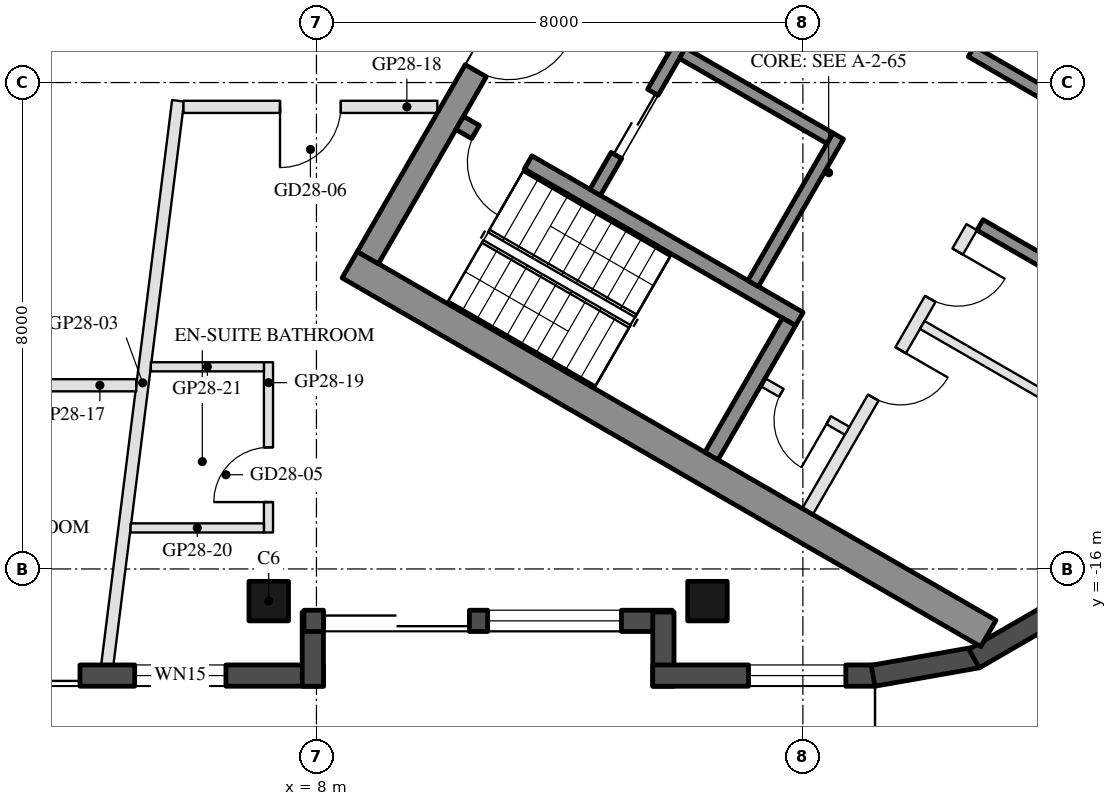
"""IFC4 building model, lengths in metres.
Left out: names, types, materials, properties, quantities, classifications, styles, units other than length and angle.
Written with IfcOpenShell. Run it as: python <this file> out.ifc"""

import sys

from ifc_helpers import new_model, si_unit, direction, frame, frame_2d, origin, origin_2d, place, context, subcontext, project, spatial, rectangle, hollow_rectangle, extrude, boolean, halfspace, element, fill, save


model = new_model("IFC4")
c1 = context("Model", 3, precision=1e-05, world=origin(), true_north=direction((0.0, 1.0)))
c2 = subcontext(c1, "Body", "Model", "MODEL_VIEW")
j1 = project(units=[si_unit("LENGTHUNIT", "METRE"), si_unit("PLANEANGLEUNIT", "RADIAN")], contexts=[c1])
p1 = place(None, origin())
s1 = spatial("IfcSite", under=j1, at=p1, CompositionType="ELEMENT")
p2 = place(p1, origin())
s2 = spatial("IfcBuilding", under=s1, at=p2, CompositionType="ELEMENT")
p3 = place(p2, frame((0.0, 0.0, 283.7)))
s3 = spatial("IfcBuildingStorey", under=s2, at=p3, CompositionType="ELEMENT", Elevation=283.7)
p4 = place(p3, frame((7.215, -16.529, 0.0), z_axis=(0.0, 0.0, 1.0), x_axis=(-1.0, 0.0, 0.0)))
e1 = element("IfcColumn", 1, at=p4, inside=s3, PredefinedType="COLUMN", context=c2, shape_type="SweptSolid", body=[
    boolean("DIFFERENCE", extrude(hollow_rectangle(XDim=0.65, YDim=0.65, WallThickness=0.03, at=origin_2d()), origin(), (0.0, 0.0, 1.0), 3.7), halfspace(frame((0.0, 0.0, 3.66), z_axis=(0.0, 0.0, 1.0), x_axis=(1.0, 0.0, 0.0)), False)),
])
p5 = place(p3, frame((14.431, -16.529, 0.0), z_axis=(0.0, 0.0, 1.0), x_axis=(-1.0, 0.0, 0.0)))
e2 = element("IfcColumn", 2, at=p5, inside=s3, PredefinedType="COLUMN", context=c2, shape_type="SweptSolid", body=[
    boolean("DIFFERENCE", extrude(hollow_rectangle(XDim=0.65, YDim=0.65, WallThickness=0.03, at=origin_2d()), origin(), (0.0, 0.0, 1.0), 3.7), halfspace(frame((0.0, 0.0, 3.653), z_axis=(0.0, 0.0, 1.0), x_axis=(1.0, 0.0, 0.0)), False)),
])
p6 = place(p3, frame((-0.9, -17.754, 0.0), z_axis=(0.0, 0.0, 1.0), x_axis=(1.0, 0.0, 0.0)))
e3 = element("IfcWall", 3, at=p6, inside=s3, PredefinedType="SOLIDWALL", context=c2, shape_type="SweptSolid", body=[
    extrude(rectangle(XDim=9.015, YDim=0.35, at=frame_2d((4.508, 0.0))), origin(), (0.0, 0.0, 1.0), 3.55),
])
p7 = place(p6, frame((3.211, 0.0, 0.0)))
e4 = element("IfcOpeningElement", 4, at=p7, cuts=e3, PredefinedType="OPENING", context=c2, shape_type="SweptSolid", body=[
    extrude(rectangle(XDim=1.8, YDim=2.4, at=frame_2d((0.9, 1.2))), frame((0.0, 0.185, 0.0), z_axis=(0.0, -1.0, 0.0), x_axis=(1.0, 0.0, 0.0)), (0.0, 0.0, 1.0), 0.37),
])
p8 = place(p6, frame((1.575, 0.0, 0.3)))
e5 = element("IfcOpeningElement", 5, at=p8, cuts=e3, PredefinedType="OPENING", context=c2, shape_type="SweptSolid", body=[
    extrude(rectangle(XDim=1.3, YDim=2.65, at=frame_2d((0.65, 1.325))), frame((0.0, 0.185, 0.0), z_axis=(0.0, -1.0, 0.0), x_axis=(1.0, 0.0, 0.0)), (0.0, 0.0, 1.0), 0.37),
])
p9 = place(p6, frame((5.911, 0.0, 0.3)))
e6 = element("IfcOpeningElement", 6, at=p9, cuts=e3, PredefinedType="OPENING", context=c2, shape_type="SweptSolid", body=[
    extrude(rectangle(XDim=1.5, YDim=2.65, at=frame_2d((0.75, 1.325))), frame((0.0, 0.185, 0.0), z_axis=(0.0, -1.0, 0.0), x_axis=(1.0, 0.0, 0.0)), (0.0, 0.0, 1.0), 0.37),
])
p10 = place(p3, frame((7.94, -17.929, 0.0), z_axis=(0.0, 0.0, 1.0), x_axis=(0.0, 1.0, 0.0)))
e7 = element("IfcWall", 7, at=p10, inside=s3, PredefinedType="SOLIDWALL", context=c2, shape_type="SweptSolid", body=[
    extrude(rectangle(XDim=1.22, YDim=0.35, at=frame_2d((0.61, 0.0))), origin(), (0.0, 0.0, 1.0), 3.55),
])
p11 = place(p3, frame((7.795, -16.854, 0.0), z_axis=(0.0, 0.0, 1.0), x_axis=(1.0, 0.0, 0.0)))
e8 = element("IfcWall", 8, at=p11, inside=s3, PredefinedType="SOLIDWALL", context=c2, shape_type="SweptSolid", body=[
    extrude(rectangle(XDim=6.055, YDim=0.35, at=frame_2d((3.028, 0.0))), origin(), (0.0, 0.0, 1.0), 3.55),
])
p12 = place(p11, frame((0.32, 0.0, 0.0)))
e9 = element("IfcOpeningElement", 9, at=p12, cuts=e8, PredefinedType="OPENING", context=c2, shape_type="SweptSolid", body=[
    extrude(rectangle(XDim=2.4, YDim=2.4, at=frame_2d((1.2, 1.2))), frame((0.0, 0.185, 0.0), z_axis=(0.0, -1.0, 0.0), x_axis=(1.0, 0.0, 0.0)), (0.0, 0.0, 1.0), 0.37),
])
p13 = place(p11, frame((3.02, 0.0, 0.3)))
e10 = element("IfcOpeningElement", 10, at=p13, cuts=e8, PredefinedType="OPENING", context=c2, shape_type="SweptSolid", body=[
    extrude(rectangle(XDim=2.2, YDim=2.65, at=frame_2d((1.1, 1.325))), frame((0.0, 0.185, 0.0), z_axis=(0.0, -1.0, 0.0), x_axis=(1.0, 0.0, 0.0)), (0.0, 0.0, 1.0), 0.37),
])
p14 = place(p3, frame((13.706, -16.709, 0.0), z_axis=(0.0, 0.0, 1.0), x_axis=(0.0, -1.0, 0.0)))
e11 = element("IfcWall", 11, at=p14, inside=s3, PredefinedType="SOLIDWALL", context=c2, shape_type="SweptSolid", body=[
    extrude(rectangle(XDim=1.22, YDim=0.35, at=frame_2d((0.61, 0.0))), origin(), (0.0, 0.0, 1.0), 3.55),
])
p15 = place(p3, frame((13.531, -17.754, 0.0), z_axis=(0.0, 0.0, 1.0), x_axis=(1.0, 0.0, 0.0)))
e12 = element("IfcWall", 12, at=p15, inside=s3, PredefinedType="SOLIDWALL", context=c2, shape_type="SweptSolid", body=[
    extrude(rectangle(XDim=3.654, YDim=0.35, at=frame_2d((1.827, 0.0))), origin(), (0.0, 0.0, 1.0), 3.55),
])
p16 = place(p15, frame((1.575, 0.0, 0.3)))
e13 = element("IfcOpeningElement", 13, at=p16, cuts=e12, PredefinedType="OPENING", context=c2, shape_type="SweptSolid", body=[
    extrude(rectangle(XDim=1.6, YDim=2.65, at=frame_2d((0.8, 1.325))), frame((0.0, 0.185, 0.0), z_axis=(0.0, -1.0, 0.0), x_axis=(1.0, 0.0, 0.0)), (0.0, 0.0, 1.0), 0.37),
])
for number, where, z_axis, x_axis in (
    (14, (17.155, -17.756, 0.0), (0.0, 0.0, 1.0), (0.985, 0.174, 0.0)),
    (15, (18.816, -17.474, 0.0), (0.0, 0.0, 1.0), (0.866, 0.5, 0.0)),
):
    element("IfcWall", number, at=place(p3, frame(where, z_axis=z_axis, x_axis=x_axis)), inside=s3, PredefinedType="SOLIDWALL", context=c2, shape_type="SweptSolid", body=[
        extrude(rectangle(XDim=1.745, YDim=0.35, at=frame_2d((0.872, 0.0))), origin(), (0.0, 0.0, 1.0), 3.55),
    ])
for number, where, z_axis, x_axis in (
    (16, (8.547, -10.997, 0.0), (0.0, 0.0, 1.0), (0.866, -0.5, 0.0)),
    (17, (13.797, -1.903, 0.0), (0.0, 0.0, 1.0), (0.866, -0.5, 0.0)),
):
    element("IfcWall", number, at=place(p3, frame(where, z_axis=z_axis, x_axis=x_axis)), inside=s3, PredefinedType="SHEAR", context=c2, shape_type="SweptSolid", body=[
        extrude(rectangle(XDim=12.129, YDim=0.5, at=frame_2d((6.064, 0.0))), origin(), (0.0, 0.0, 1.0), 3.5),
    ])
p17 = place(p3, frame((8.845, -10.88, 0.0), z_axis=(0.0, 0.0, 1.0), x_axis=(0.500004234368, 0.866022959057, 0.0)))
e18 = element("IfcWall", 18, at=p17, inside=s3, PredefinedType="SHEAR", context=c2, shape_type="SweptSolid", body=[
    extrude(rectangle(XDim=10.0, YDim=0.4, at=frame_2d((5.0, 0.0))), origin(), (0.0, 0.0, 1.0), 3.5),
])
p18 = place(p17, frame((3.55, 0.0, 0.0)))
e19 = element("IfcOpeningElement", 19, at=p18, cuts=e18, PredefinedType="OPENING", context=c2, shape_type="SweptSolid", body=[
    extrude(rectangle(XDim=1.1, YDim=2.1, at=frame_2d((0.55, 1.05))), frame((0.0, 0.21, 0.0), z_axis=(0.0, -1.0, 0.0), x_axis=(1.0, 0.0, 0.0)), (0.0, 0.0, 1.0), 0.42),
])
p19 = place(p17, frame((5.85, 0.0, 0.0)))
e20 = element("IfcOpeningElement", 20, at=p19, cuts=e18, PredefinedType="OPENING", context=c2, shape_type="SweptSolid", body=[
    extrude(rectangle(XDim=1.4, YDim=2.1, at=frame_2d((0.7, 1.05))), frame((0.0, 0.21, 0.0), z_axis=(0.0, -1.0, 0.0), x_axis=(1.0, 0.0, 0.0)), (0.0, 0.0, 1.0), 0.42),
])
p20 = place(p3, frame((10.356, -8.664, 0.0), z_axis=(0.0, 0.0, 1.0), x_axis=(0.866028629588, -0.499994412703, 0.0)))
e21 = element("IfcWall", 21, at=p20, inside=s3, PredefinedType="SHEAR", context=c2, shape_type="SweptSolid", body=[
    extrude(rectangle(XDim=6.45, YDim=0.25, at=frame_2d((3.225, 0.0))), origin(), (0.0, 0.0, 1.0), 3.5),
])
p21 = place(p20, frame((0.3, 0.0, 0.0)))
e22 = element("IfcOpeningElement", 22, at=p21, cuts=e21, PredefinedType="OPENING", context=c2, shape_type="SweptSolid", body=[
    extrude(rectangle(XDim=1.0, YDim=2.1, at=frame_2d((0.5, 1.05))), frame((0.0, 0.135, 0.0), z_axis=(0.0, -1.0, 0.0), x_axis=(1.0, 0.0, 0.0)), (0.0, 0.0, 1.0), 0.27),
])
p22 = place(p3, frame((14.496, -14.143, 0.0), z_axis=(0.0, 0.0, 1.0), x_axis=(0.500062241894, 0.865989465428, 0.0)))
e23 = element("IfcWall", 23, at=p22, inside=s3, PredefinedType="SHEAR", context=c2, shape_type="SweptSolid", body=[
    extrude(rectangle(XDim=2.55, YDim=0.25, at=frame_2d((1.275, 0.0))), origin(), (0.0, 0.0, 1.0), 3.5),
])
p23 = place(p3, frame((15.181, -11.305, 0.0), z_axis=(0.0, 0.0, 1.0), x_axis=(0.49994636267, 0.866056369097, 0.0)))
e24 = element("IfcWall", 24, at=p23, inside=s3, PredefinedType="SHEAR", context=c2, shape_type="SweptSolid", body=[
    extrude(rectangle(XDim=2.8, YDim=0.2, at=frame_2d((1.4, 0.0))), origin(), (0.0, 0.0, 1.0), 3.5),
])
p24 = place(p3, frame((12.583, -9.805, 0.0), z_axis=(0.0, 0.0, 1.0), x_axis=(0.49994636267, 0.866056369097, 0.0)))
e25 = element("IfcWall", 25, at=p24, inside=s3, PredefinedType="SHEAR", context=c2, shape_type="SweptSolid", body=[
    extrude(rectangle(XDim=2.8, YDim=0.2, at=frame_2d((1.4, 0.0))), origin(), (0.0, 0.0, 1.0), 3.5),
])
p25 = place(p24, frame((0.7, 0.0, 0.0)))
e26 = element("IfcOpeningElement", 26, at=p25, cuts=e25, PredefinedType="OPENING", context=c2, shape_type="SweptSolid", body=[
    extrude(rectangle(XDim=1.2, YDim=2.1, at=frame_2d((0.6, 1.05))), frame((0.0, 0.11, 0.0), z_axis=(0.0, -1.0, 0.0), x_axis=(1.0, 0.0, 0.0)), (0.0, 0.0, 1.0), 0.22),
])
p26 = place(p3, frame((11.768, -6.217, 0.0), z_axis=(0.0, 0.0, 1.0), x_axis=(0.866050077142, -0.499957262057, 0.0)))
e27 = element("IfcWall", 27, at=p26, inside=s3, PredefinedType="SHEAR", context=c2, shape_type="SweptSolid", body=[
    extrude(rectangle(XDim=2.4, YDim=0.2, at=frame_2d((1.2, 0.0))), origin(), (0.0, 0.0, 1.0), 3.5),
])
p27 = place(p3, frame((14.02, -7.517, 0.0), z_axis=(0.0, 0.0, 1.0), x_axis=(0.866034573852, -0.49998411664, 0.0)))
e28 = element("IfcWall", 28, at=p27, inside=s3, PredefinedType="SHEAR", context=c2, shape_type="SweptSolid", body=[
    extrude(rectangle(XDim=2.8, YDim=0.2, at=frame_2d((1.4, 0.0))), origin(), (0.0, 0.0, 1.0), 3.5),
])
p28 = place(p3, frame((12.968, -4.138, 0.0), z_axis=(0.0, 0.0, 1.0), x_axis=(0.866028328073, -0.49999493495, 0.0)))
e29 = element("IfcWall", 29, at=p28, inside=s3, PredefinedType="SHEAR", context=c2, shape_type="SweptSolid", body=[
    extrude(rectangle(XDim=10.16, YDim=0.2, at=frame_2d((5.08, 0.0))), origin(), (0.0, 0.0, 1.0), 3.5),
])
p29 = place(p28, frame((0.62, 0.0, 0.0)))
e30 = element("IfcOpeningElement", 30, at=p29, cuts=e29, PredefinedType="OPENING", context=c2, shape_type="SweptSolid", body=[
    extrude(rectangle(XDim=1.1, YDim=2.1, at=frame_2d((0.55, 1.05))), frame((0.0, 0.11, 0.0), z_axis=(0.0, -1.0, 0.0), x_axis=(1.0, 0.0, 0.0)), (0.0, 0.0, 1.0), 0.22),
])
p30 = place(p28, frame((5.8, 0.0, 0.0)))
e31 = element("IfcOpeningElement", 31, at=p30, cuts=e29, PredefinedType="OPENING", context=c2, shape_type="SweptSolid", body=[
    extrude(rectangle(XDim=0.9, YDim=2.1, at=frame_2d((0.45, 1.05))), frame((0.0, 0.11, 0.0), z_axis=(0.0, -1.0, 0.0), x_axis=(1.0, 0.0, 0.0)), (0.0, 0.0, 1.0), 0.22),
])
p31 = place(p3, frame((18.913, -10.342, 0.0), z_axis=(0.0, 0.0, 1.0), x_axis=(0.866038183914, -0.499977863513, 0.0)))
e32 = element("IfcWall", 32, at=p31, inside=s3, PredefinedType="SHEAR", context=c2, shape_type="SweptSolid", body=[
    extrude(rectangle(XDim=1.71, YDim=0.2, at=frame_2d((0.855, 0.0))), origin(), (0.0, 0.0, 1.0), 3.5),
])
p32 = place(p3, frame((16.076, -15.055, 0.0), z_axis=(0.0, 0.0, 1.0), x_axis=(0.499995103361, 0.866028230842, 0.0)))
e33 = element("IfcWall", 33, at=p32, inside=s3, PredefinedType="PARTITIONING", context=c2, shape_type="SweptSolid", body=[
    extrude(rectangle(XDim=5.4, YDim=0.2, at=frame_2d((2.7, 0.0))), origin(), (0.0, 0.0, 1.0), 3.5),
])
p33 = place(p32, frame((2.163, 0.0, 0.0)))
e34 = element("IfcOpeningElement", 34, at=p33, cuts=e33, PredefinedType="OPENING", context=c2, shape_type="SweptSolid", body=[
    extrude(rectangle(XDim=0.9, YDim=2.1, at=frame_2d((0.45, 1.05))), frame((0.0, 0.11, 0.0), z_axis=(0.0, -1.0, 0.0), x_axis=(1.0, 0.0, 0.0)), (0.0, 0.0, 1.0), 0.22),
])
p34 = place(p32, frame((4.038, 0.0, 0.0)))
e35 = element("IfcOpeningElement", 35, at=p34, cuts=e33, PredefinedType="OPENING", context=c2, shape_type="SweptSolid", body=[
    extrude(rectangle(XDim=0.9, YDim=2.1, at=frame_2d((0.45, 1.05))), frame((0.0, 0.11, 0.0), z_axis=(0.0, -1.0, 0.0), x_axis=(1.0, 0.0, 0.0)), (0.0, 0.0, 1.0), 0.22),
])
p35 = place(p3, frame((15.342, -12.928, 0.0), z_axis=(0.0, 0.0, 1.0), x_axis=(0.865989903783, -0.500061482766, 0.0)))
e36 = element("IfcWall", 36, at=p35, inside=s3, PredefinedType="PARTITIONING", context=c2, shape_type="SweptSolid", body=[
    extrude(rectangle(XDim=1.6, YDim=0.15, at=frame_2d((0.8, 0.0))), origin(), (0.0, 0.0, 1.0), 3.5),
])
p36 = place(p35, frame((0.35, 0.0, 0.0)))
e37 = element("IfcOpeningElement", 37, at=p36, cuts=e36, PredefinedType="OPENING", context=c2, shape_type="SweptSolid", body=[
    extrude(rectangle(XDim=0.9, YDim=2.1, at=frame_2d((0.45, 1.05))), frame((0.0, 0.085, 0.0), z_axis=(0.0, -1.0, 0.0), x_axis=(1.0, 0.0, 0.0)), (0.0, 0.0, 1.0), 0.17),
])
p37 = place(p3, frame((17.963, -11.987, 0.0), z_axis=(0.0, 0.0, 1.0), x_axis=(0.866010510293, -0.500025795397, 0.0)))
e38 = element("IfcWall", 38, at=p37, inside=s3, PredefinedType="PARTITIONING", context=c2, shape_type="SweptSolid", body=[
    extrude(rectangle(XDim=4.459, YDim=0.15, at=frame_2d((2.229, 0.0))), origin(), (0.0, 0.0, 1.0), 3.5),
])
p38 = place(p3, frame((4.56, -17.579, 0.0), z_axis=(0.0, 0.0, 1.0), x_axis=(0.124584174438, 0.992209042228, 0.0)))
e39 = element("IfcWall", 39, at=p38, inside=s3, PredefinedType="PARTITIONING", context=c2, shape_type="SweptSolid", body=[
    extrude(rectangle(XDim=9.351, YDim=0.2, at=frame_2d((4.676, 0.0))), origin(), (0.0, 0.0, 1.0), 3.1),
])
p39 = place(p3, frame((5.037, -12.979, 0.0), z_axis=(0.0, 0.0, 1.0), x_axis=(-1.0, 0.0, 0.0)))
e40 = element("IfcWall", 40, at=p39, inside=s3, PredefinedType="PARTITIONING", context=c2, shape_type="SweptSolid", body=[
    extrude(rectangle(XDim=4.988, YDim=0.2, at=frame_2d((2.494, 0.0))), origin(), (0.0, 0.0, 1.0), 3.05),
])
p40 = place(p39, frame((1.994, 0.0, 0.0)))
e41 = element("IfcOpeningElement", 41, at=p40, cuts=e40, PredefinedType="OPENING", context=c2, shape_type="SweptSolid", body=[
    extrude(rectangle(XDim=1.0, YDim=2.1, at=frame_2d((0.5, 1.05))), frame((0.0, 0.11, 0.0), z_axis=(0.0, -1.0, 0.0), x_axis=(1.0, 0.0, 0.0)), (0.0, 0.0, 1.0), 0.22),
])
p41 = place(p3, frame((9.988, -8.4, 0.0), z_axis=(0.0, 0.0, 1.0), x_axis=(-1.0, 0.0, 0.0)))
e42 = element("IfcWall", 42, at=p41, inside=s3, PredefinedType="PARTITIONING", context=c2, shape_type="SweptSolid", body=[
    extrude(rectangle(XDim=4.175, YDim=0.2, at=frame_2d((2.087, 0.0))), origin(), (0.0, 0.0, 1.0), 3.05),
])
p42 = place(p41, frame((1.587, 0.0, 0.0)))
e43 = element("IfcOpeningElement", 43, at=p42, cuts=e42, PredefinedType="OPENING", context=c2, shape_type="SweptSolid", body=[
    extrude(rectangle(XDim=1.0, YDim=2.1, at=frame_2d((0.5, 1.05))), frame((0.0, 0.11, 0.0), z_axis=(0.0, -1.0, 0.0), x_axis=(1.0, 0.0, 0.0)), (0.0, 0.0, 1.0), 0.22),
])
p43 = place(p3, frame((7.211, -15.4, 0.0), z_axis=(0.0, 0.0, 1.0), x_axis=(0.0, 1.0, 0.0)))
e44 = element("IfcWall", 44, at=p43, inside=s3, PredefinedType="PARTITIONING", context=c2, shape_type="SweptSolid", body=[
    extrude(rectangle(XDim=2.8, YDim=0.15, at=frame_2d((1.4, 0.0))), origin(), (0.0, 0.0, 1.0), 3.05),
])
p44 = place(p43, frame((0.5, 0.0, 0.0)))
e45 = element("IfcOpeningElement", 45, at=p44, cuts=e44, PredefinedType="OPENING", context=c2, shape_type="SweptSolid", body=[
    extrude(rectangle(XDim=0.9, YDim=2.1, at=frame_2d((0.45, 1.05))), frame((0.0, 0.085, 0.0), z_axis=(0.0, -1.0, 0.0), x_axis=(1.0, 0.0, 0.0)), (0.0, 0.0, 1.0), 0.17),
])
p45 = place(p3, frame((4.944, -15.325, 0.0), z_axis=(0.0, 0.0, 1.0), x_axis=(1.0, 0.0, 0.0)))
e46 = element("IfcWall", 46, at=p45, inside=s3, PredefinedType="PARTITIONING", context=c2, shape_type="SweptSolid", body=[
    extrude(rectangle(XDim=2.192, YDim=0.15, at=frame_2d((1.096, 0.0))), origin(), (0.0, 0.0, 1.0), 3.05),
])
p46 = place(p3, frame((5.277, -12.675, 0.0), z_axis=(0.0, 0.0, 1.0), x_axis=(1.0, 0.0, 0.0)))
e47 = element("IfcWall", 47, at=p46, inside=s3, PredefinedType="PARTITIONING", context=c2, shape_type="SweptSolid", body=[
    extrude(rectangle(XDim=1.859, YDim=0.15, at=frame_2d((0.93, 0.0))), origin(), (0.0, 0.0, 1.0), 3.05),
])
p47 = place(p7, frame((1.8, 0.0, 0.0), z_axis=(0.0, 0.0, 1.0), x_axis=(-1.0, 0.0, 0.0)))
e48 = element("IfcDoor", 48, at=p47, inside=s3, OperationType="SLIDING_TO_LEFT", PredefinedType="DOOR", context=c2, shape_type="SweptSolid", body=[
    extrude(rectangle(XDim=1.8, YDim=2.4, at=frame_2d((0.9, 1.2))), frame((0.0, 0.025, 0.0), z_axis=(0.0, -1.0, 0.0), x_axis=(1.0, 0.0, 0.0)), (0.0, 0.0, 1.0), 0.05),
])
fill(e4, e48)
p48 = place(p9, origin())
e49 = element("IfcWindow", 49, at=p48, inside=s3, PartitioningType="SINGLE_PANEL", PredefinedType="WINDOW", context=c2, shape_type="SweptSolid", body=[
    extrude(rectangle(XDim=1.5, YDim=2.65, at=frame_2d((0.75, 1.325))), frame((0.0, 0.03, 0.0), z_axis=(0.0, -1.0, 0.0), x_axis=(1.0, 0.0, 0.0)), (0.0, 0.0, 1.0), 0.06),
])
fill(e6, e49)
p49 = place(p12, frame((2.4, 0.0, 0.0), z_axis=(0.0, 0.0, 1.0), x_axis=(-1.0, 0.0, 0.0)))
e50 = element("IfcDoor", 50, at=p49, inside=s3, OperationType="SLIDING_TO_LEFT", PredefinedType="DOOR", context=c2, shape_type="SweptSolid", body=[
    extrude(rectangle(XDim=2.4, YDim=2.4, at=frame_2d((1.2, 1.2))), frame((0.0, 0.025, 0.0), z_axis=(0.0, -1.0, 0.0), x_axis=(1.0, 0.0, 0.0)), (0.0, 0.0, 1.0), 0.05),
])
fill(e9, e50)
p50 = place(p13, origin())
e51 = element("IfcWindow", 51, at=p50, inside=s3, PartitioningType="SINGLE_PANEL", PredefinedType="WINDOW", context=c2, shape_type="SweptSolid", body=[
    extrude(rectangle(XDim=2.2, YDim=2.65, at=frame_2d((1.1, 1.325))), frame((0.0, 0.03, 0.0), z_axis=(0.0, -1.0, 0.0), x_axis=(1.0, 0.0, 0.0)), (0.0, 0.0, 1.0), 0.06),
])
fill(e10, e51)
p51 = place(p16, origin())
e52 = element("IfcWindow", 52, at=p51, inside=s3, PartitioningType="SINGLE_PANEL", PredefinedType="WINDOW", context=c2, shape_type="SweptSolid", body=[
    extrude(rectangle(XDim=1.6, YDim=2.65, at=frame_2d((0.8, 1.325))), frame((0.0, 0.03, 0.0), z_axis=(0.0, -1.0, 0.0), x_axis=(1.0, 0.0, 0.0)), (0.0, 0.0, 1.0), 0.06),
])
fill(e13, e52)
p52 = place(p25, origin())
e53 = element("IfcDoor", 53, at=p52, inside=s3, OperationType="DOUBLE_DOOR_SLIDING", PredefinedType="DOOR", context=c2, shape_type="SweptSolid", body=[
    extrude(rectangle(XDim=1.2, YDim=2.1, at=frame_2d((0.6, 1.05))), frame((0.0, 0.025, 0.0), z_axis=(0.0, -1.0, 0.0), x_axis=(1.0, 0.0, 0.0)), (0.0, 0.0, 1.0), 0.05),
])
fill(e26, e53)
p53 = place(p36, frame((0.9, 0.0, 0.0), z_axis=(0.0, 0.0, 1.0), x_axis=(-1.0, 0.0, 0.0)))
e54 = element("IfcDoor", 54, at=p53, inside=s3, OperationType="SINGLE_SWING_LEFT", PredefinedType="DOOR", context=c2, shape_type="SweptSolid", body=[
    extrude(rectangle(XDim=0.9, YDim=2.1, at=frame_2d((0.45, 1.05))), frame((0.0, 0.025, 0.0), z_axis=(0.0, -1.0, 0.0), x_axis=(1.0, 0.0, 0.0)), (0.0, 0.0, 1.0), 0.05),
])
fill(e37, e54)
p54 = place(p30, origin())
e55 = element("IfcDoor", 55, at=p54, inside=s3, OperationType="SINGLE_SWING_LEFT", PredefinedType="DOOR", context=c2, shape_type="SweptSolid", body=[
    extrude(rectangle(XDim=0.9, YDim=2.1, at=frame_2d((0.45, 1.05))), frame((0.0, 0.025, 0.0), z_axis=(0.0, -1.0, 0.0), x_axis=(1.0, 0.0, 0.0)), (0.0, 0.0, 1.0), 0.05),
])
fill(e31, e55)
p55 = place(p33, frame((0.9, 0.0, 0.0), z_axis=(0.0, 0.0, 1.0), x_axis=(-1.0, 0.0, 0.0)))
e56 = element("IfcDoor", 56, at=p55, inside=s3, OperationType="SINGLE_SWING_LEFT", PredefinedType="DOOR", context=c2, shape_type="SweptSolid", body=[
    extrude(rectangle(XDim=0.9, YDim=2.1, at=frame_2d((0.45, 1.05))), frame((0.0, 0.025, 0.0), z_axis=(0.0, -1.0, 0.0), x_axis=(1.0, 0.0, 0.0)), (0.0, 0.0, 1.0), 0.05),
])
fill(e34, e56)
p56 = place(p34, frame((0.9, 0.0, 0.0), z_axis=(0.0, 0.0, 1.0), x_axis=(-1.0, 0.0, 0.0)))
e57 = element("IfcDoor", 57, at=p56, inside=s3, OperationType="SINGLE_SWING_LEFT", PredefinedType="DOOR", context=c2, shape_type="SweptSolid", body=[
    extrude(rectangle(XDim=0.9, YDim=2.1, at=frame_2d((0.45, 1.05))), frame((0.0, 0.025, 0.0), z_axis=(0.0, -1.0, 0.0), x_axis=(1.0, 0.0, 0.0)), (0.0, 0.0, 1.0), 0.05),
])
fill(e35, e57)
p57 = place(p18, frame((1.1, 0.0, 0.0), z_axis=(0.0, 0.0, 1.0), x_axis=(-1.0, 0.0, 0.0)))
e58 = element("IfcDoor", 58, at=p57, inside=s3, OperationType="SINGLE_SWING_LEFT", PredefinedType="DOOR", context=c2, shape_type="SweptSolid", body=[
    extrude(rectangle(XDim=1.1, YDim=2.1, at=frame_2d((0.55, 1.05))), frame((0.0, 0.025, 0.0), z_axis=(0.0, -1.0, 0.0), x_axis=(1.0, 0.0, 0.0)), (0.0, 0.0, 1.0), 0.05),
])
fill(e19, e58)
p58 = place(p21, frame((1.0, 0.0, 0.0), z_axis=(0.0, 0.0, 1.0), x_axis=(-1.0, 0.0, 0.0)))
e59 = element("IfcDoor", 59, at=p58, inside=s3, OperationType="SINGLE_SWING_LEFT", PredefinedType="DOOR", context=c2, shape_type="SweptSolid", body=[
    extrude(rectangle(XDim=1.0, YDim=2.1, at=frame_2d((0.5, 1.05))), frame((0.0, 0.025, 0.0), z_axis=(0.0, -1.0, 0.0), x_axis=(1.0, 0.0, 0.0)), (0.0, 0.0, 1.0), 0.05),
])
fill(e22, e59)
p59 = place(p44, origin())
e60 = element("IfcDoor", 60, at=p59, inside=s3, OperationType="SINGLE_SWING_LEFT", PredefinedType="DOOR", context=c2, shape_type="SweptSolid", body=[
    extrude(rectangle(XDim=0.9, YDim=2.1, at=frame_2d((0.45, 1.05))), frame((0.0, 0.025, 0.0), z_axis=(0.0, -1.0, 0.0), x_axis=(1.0, 0.0, 0.0)), (0.0, 0.0, 1.0), 0.05),
])
fill(e45, e60)
p60 = place(p42, origin())
e61 = element("IfcDoor", 61, at=p60, inside=s3, OperationType="SINGLE_SWING_RIGHT", PredefinedType="DOOR", context=c2, shape_type="SweptSolid", body=[
    extrude(rectangle(XDim=1.0, YDim=2.1, at=frame_2d((0.5, 1.05))), frame((0.0, 0.025, 0.0), z_axis=(0.0, -1.0, 0.0), x_axis=(1.0, 0.0, 0.0)), (0.0, 0.0, 1.0), 0.05),
])
fill(e43, e61)
save(model, sys.argv[1])
